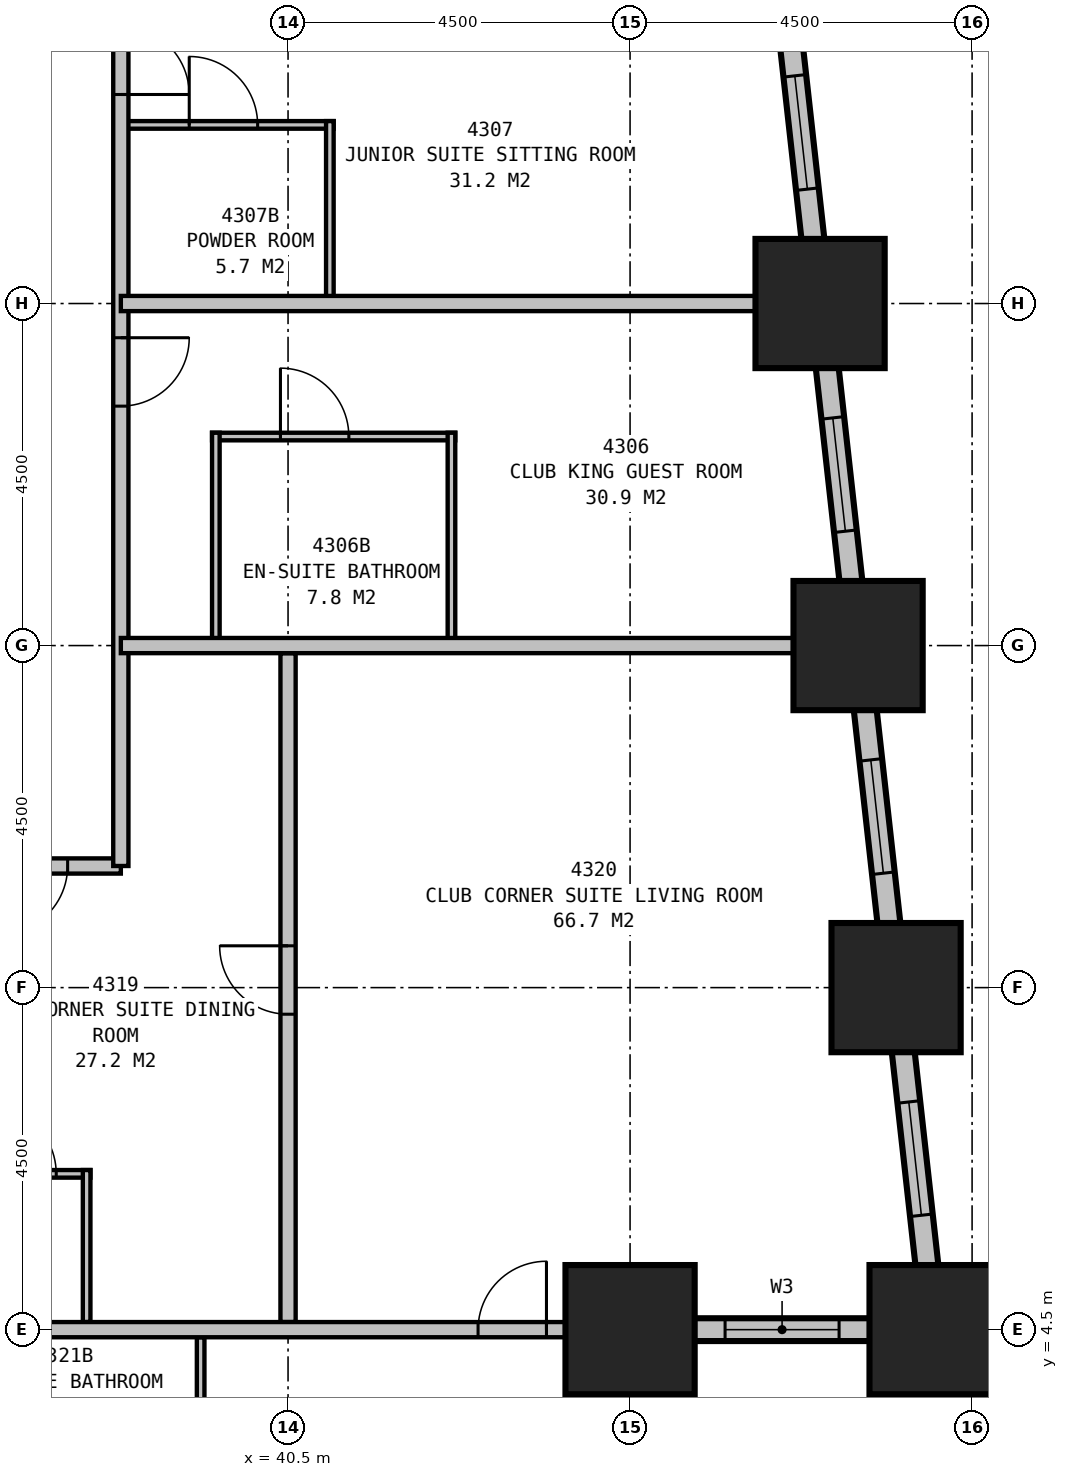
"""IFC4 building model, lengths in metres.
Left out: names, types, materials, properties, quantities, classifications, styles, units other than length and angle.
Written with IfcOpenShell. Run it as: python <this file> out.ifc"""

import sys

from ifc_helpers import new_model, si_unit, direction, frame, frame_2d, origin, origin_2d, place, context, subcontext, project, spatial, rectangle, extrude, element, fill, save


model = new_model("IFC4")
c1 = context("Model", 3, precision=1e-05, world=origin(), true_north=direction((0.0, 1.0)))
c2 = subcontext(c1, "Body", "Model", "MODEL_VIEW")
j1 = project(units=[si_unit("LENGTHUNIT", "METRE"), si_unit("PLANEANGLEUNIT", "RADIAN")], contexts=[c1])
p1 = place(None, origin())
s1 = spatial("IfcSite", under=j1, at=p1, CompositionType="ELEMENT")
p2 = place(p1, origin())
s2 = spatial("IfcBuilding", under=s1, at=p2, CompositionType="ELEMENT")
p3 = place(p2, frame((0.0, 0.0, 169.4)))
s3 = spatial("IfcBuildingStorey", under=s2, at=p3, CompositionType="ELEMENT", Elevation=169.4)
for number, where, z_axis, x_axis in (
    (1, (45.0, 4.5, 0.0), (0.0, 0.0, 1.0), (1.0, 0.0, 0.0)),
    (2, (49.0, 4.5, 0.0), (0.0, 0.0, 1.0), (1.0, 0.0, 0.0)),
    (3, (48.5, 9.0, 0.0), (0.0, 0.0, 1.0), (1.0, 0.0, 0.0)),
    (4, (48.0, 13.5, 0.0), (0.0, 0.0, 1.0), (1.0, 0.0, 0.0)),
    (5, (47.5, 18.0, 0.0), (0.0, 0.0, 1.0), (1.0, 0.0, 0.0)),
):
    element("IfcColumn", number, at=place(p3, frame(where, z_axis=z_axis, x_axis=x_axis)), inside=s3, PredefinedType="COLUMN", context=c2, shape_type="SweptSolid", body=[
        extrude(rectangle(XDim=1.7, YDim=1.7, at=origin_2d()), origin(), (0.0, 0.0, 1.0), 3.5),
    ])
p4 = place(p3, frame((45.0, -0.15, 0.0), z_axis=(0.0, 0.0, 1.0), x_axis=(0.0, 1.0, 0.0)))
e6 = element("IfcWall", 6, at=p4, inside=s3, PredefinedType="STANDARD", context=c2, shape_type="SweptSolid", body=[
    extrude(rectangle(XDim=4.8, YDim=0.3, at=frame_2d((2.4, 0.0))), origin(), (0.0, 0.0, 1.0), 2.25),
])
p5 = place(p4, frame((1.2, 0.0, 0.5)))
e7 = element("IfcOpeningElement", 7, at=p5, cuts=e6, PredefinedType="OPENING", context=c2, shape_type="SweptSolid", body=[
    extrude(rectangle(XDim=2.4, YDim=1.6, at=frame_2d((1.2, 0.8))), frame((0.0, 0.16, 0.0), z_axis=(0.0, -1.0, 0.0), x_axis=(1.0, 0.0, 0.0)), (0.0, 0.0, 1.0), 0.32),
])
p6 = place(p3, frame((44.85, 4.5, 0.0), z_axis=(0.0, 0.0, 1.0), x_axis=(1.0, 0.0, 0.0)))
e8 = element("IfcWall", 8, at=p6, inside=s3, PredefinedType="STANDARD", context=c2, shape_type="SweptSolid", body=[
    extrude(rectangle(XDim=4.3, YDim=0.3, at=frame_2d((2.15, 0.0))), origin(), (0.0, 0.0, 1.0), 2.25),
])
p7 = place(p6, frame((1.4, 0.0, 0.5)))
e9 = element("IfcOpeningElement", 9, at=p7, cuts=e8, PredefinedType="OPENING", context=c2, shape_type="SweptSolid", body=[
    extrude(rectangle(XDim=1.5, YDim=1.6, at=frame_2d((0.75, 0.8))), frame((0.0, 0.16, 0.0), z_axis=(0.0, -1.0, 0.0), x_axis=(1.0, 0.0, 0.0)), (0.0, 0.0, 1.0), 0.32),
])
p8 = place(p3, frame((49.017, 4.351, 0.0), z_axis=(0.0, 0.0, 1.0), x_axis=(-0.110433201132, 0.993883548555, 0.0)))
e10 = element("IfcWall", 10, at=p8, inside=s3, PredefinedType="STANDARD", context=c2, shape_type="SweptSolid", body=[
    extrude(rectangle(XDim=31.994, YDim=0.3, at=frame_2d((15.997, 0.0))), origin(), (0.0, 0.0, 1.0), 2.25),
])
p9 = place(p8, frame((1.664, 0.0, 0.5)))
e11 = element("IfcOpeningElement", 11, at=p9, cuts=e10, PredefinedType="OPENING", context=c2, shape_type="SweptSolid", body=[
    extrude(rectangle(XDim=1.5, YDim=1.6, at=frame_2d((0.75, 0.8))), frame((0.0, 0.16, 0.0), z_axis=(0.0, -1.0, 0.0), x_axis=(1.0, 0.0, 0.0)), (0.0, 0.0, 1.0), 0.32),
])
p10 = place(p8, frame((6.192, 0.0, 0.5)))
e12 = element("IfcOpeningElement", 12, at=p10, cuts=e10, PredefinedType="OPENING", context=c2, shape_type="SweptSolid", body=[
    extrude(rectangle(XDim=1.5, YDim=1.6, at=frame_2d((0.75, 0.8))), frame((0.0, 0.16, 0.0), z_axis=(0.0, -1.0, 0.0), x_axis=(1.0, 0.0, 0.0)), (0.0, 0.0, 1.0), 0.32),
])
p11 = place(p8, frame((10.719, 0.0, 0.5)))
e13 = element("IfcOpeningElement", 13, at=p11, cuts=e10, PredefinedType="OPENING", context=c2, shape_type="SweptSolid", body=[
    extrude(rectangle(XDim=1.5, YDim=1.6, at=frame_2d((0.75, 0.8))), frame((0.0, 0.16, 0.0), z_axis=(0.0, -1.0, 0.0), x_axis=(1.0, 0.0, 0.0)), (0.0, 0.0, 1.0), 0.32),
])
p12 = place(p8, frame((15.247, 0.0, 0.5)))
e14 = element("IfcOpeningElement", 14, at=p12, cuts=e10, PredefinedType="OPENING", context=c2, shape_type="SweptSolid", body=[
    extrude(rectangle(XDim=1.5, YDim=1.6, at=frame_2d((0.75, 0.8))), frame((0.0, 0.16, 0.0), z_axis=(0.0, -1.0, 0.0), x_axis=(1.0, 0.0, 0.0)), (0.0, 0.0, 1.0), 0.32),
])
p13 = place(p8, frame((19.775, 0.0, 0.5)))
e15 = element("IfcOpeningElement", 15, at=p13, cuts=e10, PredefinedType="OPENING", context=c2, shape_type="SweptSolid", body=[
    extrude(rectangle(XDim=1.5, YDim=1.6, at=frame_2d((0.75, 0.8))), frame((0.0, 0.16, 0.0), z_axis=(0.0, -1.0, 0.0), x_axis=(1.0, 0.0, 0.0)), (0.0, 0.0, 1.0), 0.32),
])
p14 = place(p8, frame((24.302, 0.0, 0.5)))
e16 = element("IfcOpeningElement", 16, at=p14, cuts=e10, PredefinedType="OPENING", context=c2, shape_type="SweptSolid", body=[
    extrude(rectangle(XDim=1.5, YDim=1.6, at=frame_2d((0.75, 0.8))), frame((0.0, 0.16, 0.0), z_axis=(0.0, -1.0, 0.0), x_axis=(1.0, 0.0, 0.0)), (0.0, 0.0, 1.0), 0.32),
])
p15 = place(p8, frame((28.83, 0.0, 0.5)))
e17 = element("IfcOpeningElement", 17, at=p15, cuts=e10, PredefinedType="OPENING", context=c2, shape_type="SweptSolid", body=[
    extrude(rectangle(XDim=1.5, YDim=1.6, at=frame_2d((0.75, 0.8))), frame((0.0, 0.16, 0.0), z_axis=(0.0, -1.0, 0.0), x_axis=(1.0, 0.0, 0.0)), (0.0, 0.0, 1.0), 0.32),
])
p16 = place(p3, frame((11.2, 10.6, 0.0), z_axis=(0.0, 0.0, 1.0), x_axis=(1.0, 0.0, 0.0)))
e18 = element("IfcWall", 18, at=p16, inside=s3, PredefinedType="PARTITIONING", context=c2, shape_type="SweptSolid", body=[
    extrude(rectangle(XDim=27.1, YDim=0.2, at=frame_2d((13.55, 0.0))), origin(), (0.0, 0.0, 1.0), 3.25),
])
p17 = place(p16, frame((4.05, 0.0, 0.0), z_axis=(0.0, 0.0, 1.0), x_axis=(-1.0, 0.0, 0.0)))
e19 = element("IfcOpeningElement", 19, at=p17, cuts=e18, PredefinedType="OPENING", context=c2, shape_type="SweptSolid", body=[
    extrude(rectangle(XDim=0.9, YDim=2.1, at=frame_2d((0.45, 1.05))), frame((0.0, 0.11, 0.0), z_axis=(0.0, -1.0, 0.0), x_axis=(1.0, 0.0, 0.0)), (0.0, 0.0, 1.0), 0.22),
])
p18 = place(p16, frame((12.65, 0.0, 0.0), z_axis=(0.0, 0.0, 1.0), x_axis=(-1.0, 0.0, 0.0)))
e20 = element("IfcOpeningElement", 20, at=p18, cuts=e18, PredefinedType="OPENING", context=c2, shape_type="SweptSolid", body=[
    extrude(rectangle(XDim=1.0, YDim=2.1, at=frame_2d((0.5, 1.05))), frame((0.0, 0.11, 0.0), z_axis=(0.0, -1.0, 0.0), x_axis=(1.0, 0.0, 0.0)), (0.0, 0.0, 1.0), 0.22),
])
p19 = place(p16, frame((17.55, 0.0, 0.0), z_axis=(0.0, 0.0, 1.0), x_axis=(-1.0, 0.0, 0.0)))
e21 = element("IfcOpeningElement", 21, at=p19, cuts=e18, PredefinedType="OPENING", context=c2, shape_type="SweptSolid", body=[
    extrude(rectangle(XDim=0.9, YDim=2.1, at=frame_2d((0.45, 1.05))), frame((0.0, 0.11, 0.0), z_axis=(0.0, -1.0, 0.0), x_axis=(1.0, 0.0, 0.0)), (0.0, 0.0, 1.0), 0.22),
])
p20 = place(p16, frame((1.6, 0.0, 0.0), z_axis=(0.0, 0.0, 1.0), x_axis=(-1.0, 0.0, 0.0)))
e22 = element("IfcOpeningElement", 22, at=p20, cuts=e18, PredefinedType="OPENING", context=c2, shape_type="SweptSolid", body=[
    extrude(rectangle(XDim=0.9, YDim=2.1, at=frame_2d((0.45, 1.05))), frame((0.0, 0.11, 0.0), z_axis=(0.0, -1.0, 0.0), x_axis=(1.0, 0.0, 0.0)), (0.0, 0.0, 1.0), 0.22),
])
p21 = place(p16, frame((26.4, 0.0, 0.0), z_axis=(0.0, 0.0, 1.0), x_axis=(-1.0, 0.0, 0.0)))
e23 = element("IfcOpeningElement", 23, at=p21, cuts=e18, PredefinedType="OPENING", context=c2, shape_type="SweptSolid", body=[
    extrude(rectangle(XDim=0.9, YDim=2.1, at=frame_2d((0.45, 1.05))), frame((0.0, 0.11, 0.0), z_axis=(0.0, -1.0, 0.0), x_axis=(1.0, 0.0, 0.0)), (0.0, 0.0, 1.0), 0.22),
])
p22 = place(p3, frame((38.3, 10.6, 0.0), z_axis=(0.0, 0.0, 1.0), x_axis=(0.0, 1.0, 0.0)))
e24 = element("IfcWall", 24, at=p22, inside=s3, PredefinedType="PARTITIONING", context=c2, shape_type="SweptSolid", body=[
    extrude(rectangle(XDim=18.7, YDim=0.2, at=frame_2d((9.35, 0.0))), origin(), (0.0, 0.0, 1.0), 3.25),
])
p23 = place(p22, frame((6.95, 0.0, 0.0), z_axis=(0.0, 0.0, 1.0), x_axis=(-1.0, 0.0, 0.0)))
e25 = element("IfcOpeningElement", 25, at=p23, cuts=e24, PredefinedType="OPENING", context=c2, shape_type="SweptSolid", body=[
    extrude(rectangle(XDim=0.9, YDim=2.1, at=frame_2d((0.45, 1.05))), frame((0.0, 0.11, 0.0), z_axis=(0.0, -1.0, 0.0), x_axis=(1.0, 0.0, 0.0)), (0.0, 0.0, 1.0), 0.22),
])
p24 = place(p22, frame((11.05, 0.0, 0.0), z_axis=(0.0, 0.0, 1.0), x_axis=(-1.0, 0.0, 0.0)))
e26 = element("IfcOpeningElement", 26, at=p24, cuts=e24, PredefinedType="OPENING", context=c2, shape_type="SweptSolid", body=[
    extrude(rectangle(XDim=0.9, YDim=2.1, at=frame_2d((0.45, 1.05))), frame((0.0, 0.11, 0.0), z_axis=(0.0, -1.0, 0.0), x_axis=(1.0, 0.0, 0.0)), (0.0, 0.0, 1.0), 0.22),
])
p25 = place(p3, frame((38.3, 18.0, 0.0), z_axis=(0.0, 0.0, 1.0), x_axis=(1.0, 0.0, 0.0)))
e27 = element("IfcWall", 27, at=p25, inside=s3, PredefinedType="PARTITIONING", context=c2, shape_type="SweptSolid", body=[
    extrude(rectangle(XDim=9.199, YDim=0.2, at=frame_2d((4.6, 0.0))), origin(), (0.0, 0.0, 1.0), 2.25),
])
for number, where, z_axis, x_axis in (
    (28, (39.55, 13.5, 0.0), (0.0, 0.0, 1.0), (0.0, 1.0, 0.0)),
    (29, (42.65, 13.5, 0.0), (0.0, 0.0, 1.0), (0.0, 1.0, 0.0)),
):
    element("IfcWall", number, at=place(p3, frame(where, z_axis=z_axis, x_axis=x_axis)), inside=s3, PredefinedType="PLUMBINGWALL", context=c2, shape_type="SweptSolid", body=[
        extrude(rectangle(XDim=2.8, YDim=0.1, at=frame_2d((1.4, 0.0))), origin(), (0.0, 0.0, 1.0), 3.25),
    ])
p26 = place(p3, frame((39.5, 16.25, 0.0), z_axis=(0.0, 0.0, 1.0), x_axis=(1.0, 0.0, 0.0)))
e30 = element("IfcWall", 30, at=p26, inside=s3, PredefinedType="PLUMBINGWALL", context=c2, shape_type="SweptSolid", body=[
    extrude(rectangle(XDim=3.2, YDim=0.1, at=frame_2d((1.6, 0.0))), origin(), (0.0, 0.0, 1.0), 3.25),
])
p27 = place(p26, frame((0.9, 0.0, 0.0)))
e31 = element("IfcOpeningElement", 31, at=p27, cuts=e30, PredefinedType="OPENING", context=c2, shape_type="SweptSolid", body=[
    extrude(rectangle(XDim=0.9, YDim=2.1, at=frame_2d((0.45, 1.05))), frame((0.0, 0.06, 0.0), z_axis=(0.0, -1.0, 0.0), x_axis=(1.0, 0.0, 0.0)), (0.0, 0.0, 1.0), 0.12),
])
p28 = place(p3, frame((41.05, 18.0, 0.0), z_axis=(0.0, 0.0, 1.0), x_axis=(0.0, 1.0, 0.0)))
e32 = element("IfcWall", 32, at=p28, inside=s3, PredefinedType="PLUMBINGWALL", context=c2, shape_type="SweptSolid", body=[
    extrude(rectangle(XDim=2.4, YDim=0.1, at=frame_2d((1.2, 0.0))), origin(), (0.0, 0.0, 1.0), 3.25),
])
p29 = place(p3, frame((38.3, 20.35, 0.0), z_axis=(0.0, 0.0, 1.0), x_axis=(1.0, 0.0, 0.0)))
e33 = element("IfcWall", 33, at=p29, inside=s3, PredefinedType="PLUMBINGWALL", context=c2, shape_type="SweptSolid", body=[
    extrude(rectangle(XDim=2.8, YDim=0.1, at=frame_2d((1.4, 0.0))), origin(), (0.0, 0.0, 1.0), 3.25),
])
p30 = place(p29, frame((0.9, 0.0, 0.0)))
e34 = element("IfcOpeningElement", 34, at=p30, cuts=e33, PredefinedType="OPENING", context=c2, shape_type="SweptSolid", body=[
    extrude(rectangle(XDim=0.9, YDim=2.1, at=frame_2d((0.45, 1.05))), frame((0.0, 0.06, 0.0), z_axis=(0.0, -1.0, 0.0), x_axis=(1.0, 0.0, 0.0)), (0.0, 0.0, 1.0), 0.12),
])
p31 = place(p3, frame((38.3, 13.5, 0.0), z_axis=(0.0, 0.0, 1.0), x_axis=(1.0, 0.0, 0.0)))
e35 = element("IfcWall", 35, at=p31, inside=s3, PredefinedType="PARTITIONING", context=c2, shape_type="SweptSolid", body=[
    extrude(rectangle(XDim=9.921, YDim=0.2, at=frame_2d((4.96, 0.0))), origin(), (0.0, 0.0, 1.0), 1.95),
])
p32 = place(p3, frame((35.9, 4.5, 0.0), z_axis=(0.0, 0.0, 1.0), x_axis=(1.0, 0.0, 0.0)))
e36 = element("IfcWall", 36, at=p32, inside=s3, PredefinedType="PARTITIONING", context=c2, shape_type="SweptSolid", body=[
    extrude(rectangle(XDim=9.1, YDim=0.2, at=frame_2d((4.55, 0.0))), origin(), (0.0, 0.0, 1.0), 3.25),
])
p33 = place(p32, frame((7.1, 0.0, 0.0)))
e37 = element("IfcOpeningElement", 37, at=p33, cuts=e36, PredefinedType="OPENING", context=c2, shape_type="SweptSolid", body=[
    extrude(rectangle(XDim=0.9, YDim=2.1, at=frame_2d((0.45, 1.05))), frame((0.0, 0.11, 0.0), z_axis=(0.0, -1.0, 0.0), x_axis=(1.0, 0.0, 0.0)), (0.0, 0.0, 1.0), 0.22),
])
p34 = place(p3, frame((40.5, 4.6, 0.0), z_axis=(0.0, 0.0, 1.0), x_axis=(0.0, 1.0, 0.0)))
e38 = element("IfcWall", 38, at=p34, inside=s3, PredefinedType="PARTITIONING", context=c2, shape_type="SweptSolid", body=[
    extrude(rectangle(XDim=8.8, YDim=0.2, at=frame_2d((4.4, 0.0))), origin(), (0.0, 0.0, 1.0), 2.25),
])
p35 = place(p34, frame((4.05, 0.0, 0.0)))
e39 = element("IfcOpeningElement", 39, at=p35, cuts=e38, PredefinedType="OPENING", context=c2, shape_type="SweptSolid", body=[
    extrude(rectangle(XDim=0.9, YDim=2.1, at=frame_2d((0.45, 1.05))), frame((0.0, 0.11, 0.0), z_axis=(0.0, -1.0, 0.0), x_axis=(1.0, 0.0, 0.0)), (0.0, 0.0, 1.0), 0.22),
])
p36 = place(p3, frame((37.85, 4.6, 0.0), z_axis=(0.0, 0.0, 1.0), x_axis=(0.0, 1.0, 0.0)))
e40 = element("IfcWall", 40, at=p36, inside=s3, PredefinedType="PLUMBINGWALL", context=c2, shape_type="SweptSolid", body=[
    extrude(rectangle(XDim=2.0, YDim=0.1, at=frame_2d((1.0, 0.0))), origin(), (0.0, 0.0, 1.0), 3.25),
])
p37 = place(p3, frame((36.1, 6.55, 0.0), z_axis=(0.0, 0.0, 1.0), x_axis=(1.0, 0.0, 0.0)))
e41 = element("IfcWall", 41, at=p37, inside=s3, PredefinedType="PLUMBINGWALL", context=c2, shape_type="SweptSolid", body=[
    extrude(rectangle(XDim=1.8, YDim=0.1, at=frame_2d((0.9, 0.0))), origin(), (0.0, 0.0, 1.0), 3.25),
])
p38 = place(p37, frame((0.45, 0.0, 0.0)))
e42 = element("IfcOpeningElement", 42, at=p38, cuts=e41, PredefinedType="OPENING", context=c2, shape_type="SweptSolid", body=[
    extrude(rectangle(XDim=0.9, YDim=2.1, at=frame_2d((0.45, 1.05))), frame((0.0, 0.06, 0.0), z_axis=(0.0, -1.0, 0.0), x_axis=(1.0, 0.0, 0.0)), (0.0, 0.0, 1.0), 0.12),
])
p39 = place(p3, frame((39.35, 4.4, 0.0), z_axis=(0.0, 0.0, 1.0), x_axis=(0.0, -1.0, 0.0)))
e43 = element("IfcWall", 43, at=p39, inside=s3, PredefinedType="PLUMBINGWALL", context=c2, shape_type="SweptSolid", body=[
    extrude(rectangle(XDim=2.3, YDim=0.1, at=frame_2d((1.15, 0.0))), origin(), (0.0, 0.0, 1.0), 3.25),
])
p40 = place(p7, origin())
e44 = element("IfcWindow", 44, at=p40, inside=s3, PartitioningType="SINGLE_PANEL", PredefinedType="WINDOW", context=c2, shape_type="SweptSolid", body=[
    extrude(rectangle(XDim=1.5, YDim=1.6, at=frame_2d((0.75, 0.8))), frame((0.0, 0.03, 0.0), z_axis=(0.0, -1.0, 0.0), x_axis=(1.0, 0.0, 0.0)), (0.0, 0.0, 1.0), 0.06),
])
fill(e9, e44)
p41 = place(p9, origin())
e45 = element("IfcWindow", 45, at=p41, inside=s3, PartitioningType="SINGLE_PANEL", PredefinedType="WINDOW", context=c2, shape_type="SweptSolid", body=[
    extrude(rectangle(XDim=1.5, YDim=1.6, at=frame_2d((0.75, 0.8))), frame((0.0, 0.03, 0.0), z_axis=(0.0, -1.0, 0.0), x_axis=(1.0, 0.0, 0.0)), (0.0, 0.0, 1.0), 0.06),
])
fill(e11, e45)
p42 = place(p10, origin())
e46 = element("IfcWindow", 46, at=p42, inside=s3, PartitioningType="SINGLE_PANEL", PredefinedType="WINDOW", context=c2, shape_type="SweptSolid", body=[
    extrude(rectangle(XDim=1.5, YDim=1.6, at=frame_2d((0.75, 0.8))), frame((0.0, 0.03, 0.0), z_axis=(0.0, -1.0, 0.0), x_axis=(1.0, 0.0, 0.0)), (0.0, 0.0, 1.0), 0.06),
])
fill(e12, e46)
p43 = place(p11, origin())
e47 = element("IfcWindow", 47, at=p43, inside=s3, PartitioningType="SINGLE_PANEL", PredefinedType="WINDOW", context=c2, shape_type="SweptSolid", body=[
    extrude(rectangle(XDim=1.5, YDim=1.6, at=frame_2d((0.75, 0.8))), frame((0.0, 0.03, 0.0), z_axis=(0.0, -1.0, 0.0), x_axis=(1.0, 0.0, 0.0)), (0.0, 0.0, 1.0), 0.06),
])
fill(e13, e47)
p44 = place(p12, origin())
e48 = element("IfcWindow", 48, at=p44, inside=s3, PartitioningType="SINGLE_PANEL", PredefinedType="WINDOW", context=c2, shape_type="SweptSolid", body=[
    extrude(rectangle(XDim=1.5, YDim=1.6, at=frame_2d((0.75, 0.8))), frame((0.0, 0.03, 0.0), z_axis=(0.0, -1.0, 0.0), x_axis=(1.0, 0.0, 0.0)), (0.0, 0.0, 1.0), 0.06),
])
fill(e14, e48)
p45 = place(p21, origin())
e49 = element("IfcDoor", 49, at=p45, inside=s3, OperationType="SINGLE_SWING_RIGHT", PredefinedType="DOOR", context=c2, shape_type="SweptSolid", body=[
    extrude(rectangle(XDim=0.9, YDim=2.1, at=frame_2d((0.45, 1.05))), frame((0.0, 0.025, 0.0), z_axis=(0.0, -1.0, 0.0), x_axis=(1.0, 0.0, 0.0)), (0.0, 0.0, 1.0), 0.05),
])
fill(e23, e49)
p46 = place(p23, origin())
e50 = element("IfcDoor", 50, at=p46, inside=s3, OperationType="SINGLE_SWING_LEFT", PredefinedType="DOOR", context=c2, shape_type="SweptSolid", body=[
    extrude(rectangle(XDim=0.9, YDim=2.1, at=frame_2d((0.45, 1.05))), frame((0.0, 0.025, 0.0), z_axis=(0.0, -1.0, 0.0), x_axis=(1.0, 0.0, 0.0)), (0.0, 0.0, 1.0), 0.05),
])
fill(e25, e50)
p47 = place(p24, origin())
e51 = element("IfcDoor", 51, at=p47, inside=s3, OperationType="SINGLE_SWING_RIGHT", PredefinedType="DOOR", context=c2, shape_type="SweptSolid", body=[
    extrude(rectangle(XDim=0.9, YDim=2.1, at=frame_2d((0.45, 1.05))), frame((0.0, 0.025, 0.0), z_axis=(0.0, -1.0, 0.0), x_axis=(1.0, 0.0, 0.0)), (0.0, 0.0, 1.0), 0.05),
])
fill(e26, e51)
p48 = place(p27, origin())
e52 = element("IfcDoor", 52, at=p48, inside=s3, OperationType="SINGLE_SWING_LEFT", PredefinedType="DOOR", context=c2, shape_type="SweptSolid", body=[
    extrude(rectangle(XDim=0.9, YDim=2.1, at=frame_2d((0.45, 1.05))), frame((0.0, 0.025, 0.0), z_axis=(0.0, -1.0, 0.0), x_axis=(1.0, 0.0, 0.0)), (0.0, 0.0, 1.0), 0.05),
])
fill(e31, e52)
p49 = place(p30, origin())
e53 = element("IfcDoor", 53, at=p49, inside=s3, OperationType="SINGLE_SWING_LEFT", PredefinedType="DOOR", context=c2, shape_type="SweptSolid", body=[
    extrude(rectangle(XDim=0.9, YDim=2.1, at=frame_2d((0.45, 1.05))), frame((0.0, 0.025, 0.0), z_axis=(0.0, -1.0, 0.0), x_axis=(1.0, 0.0, 0.0)), (0.0, 0.0, 1.0), 0.05),
])
fill(e34, e53)
p50 = place(p33, origin())
e54 = element("IfcDoor", 54, at=p50, inside=s3, OperationType="SINGLE_SWING_RIGHT", PredefinedType="DOOR", context=c2, shape_type="SweptSolid", body=[
    extrude(rectangle(XDim=0.9, YDim=2.1, at=frame_2d((0.45, 1.05))), frame((0.0, 0.025, 0.0), z_axis=(0.0, -1.0, 0.0), x_axis=(1.0, 0.0, 0.0)), (0.0, 0.0, 1.0), 0.05),
])
fill(e37, e54)
p51 = place(p35, origin())
e55 = element("IfcDoor", 55, at=p51, inside=s3, OperationType="SINGLE_SWING_RIGHT", PredefinedType="DOOR", context=c2, shape_type="SweptSolid", body=[
    extrude(rectangle(XDim=0.9, YDim=2.1, at=frame_2d((0.45, 1.05))), frame((0.0, 0.025, 0.0), z_axis=(0.0, -1.0, 0.0), x_axis=(1.0, 0.0, 0.0)), (0.0, 0.0, 1.0), 0.05),
])
fill(e39, e55)
p52 = place(p38, origin())
e56 = element("IfcDoor", 56, at=p52, inside=s3, OperationType="SINGLE_SWING_LEFT", PredefinedType="DOOR", context=c2, shape_type="SweptSolid", body=[
    extrude(rectangle(XDim=0.9, YDim=2.1, at=frame_2d((0.45, 1.05))), frame((0.0, 0.025, 0.0), z_axis=(0.0, -1.0, 0.0), x_axis=(1.0, 0.0, 0.0)), (0.0, 0.0, 1.0), 0.05),
])
fill(e42, e56)
save(model, sys.argv[1])
